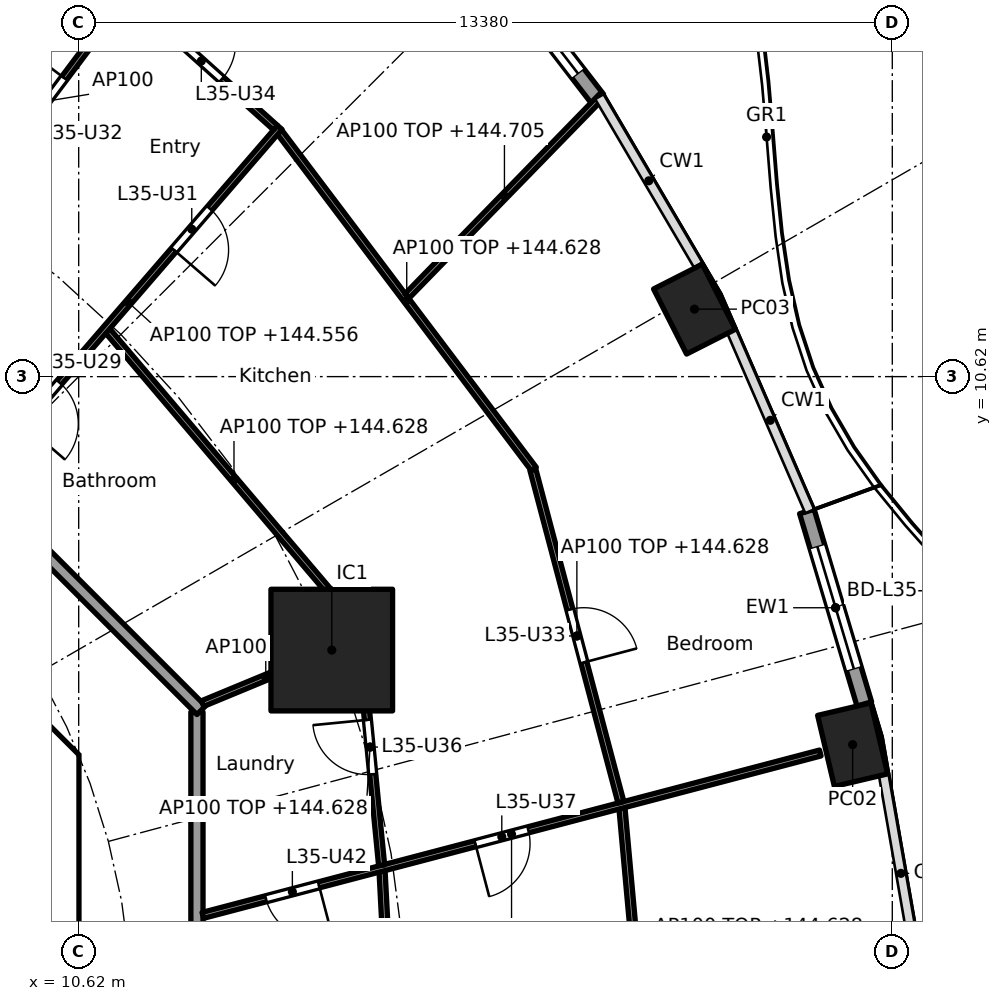
"""IFC4 building model, lengths in metres.
Left out: names, types, materials, properties, quantities, classifications, styles, units other than length and angle.
Written with IfcOpenShell. Run it as: python <this file> out.ifc"""

import sys

from ifc_helpers import new_model, si_unit, direction, frame, frame_2d, origin, origin_2d, place, context, subcontext, project, spatial, polyline, rectangle, hollow_rectangle, outline, extrude, element, fill, save


model = new_model("IFC4")
c1 = context("Model", 3, precision=1e-05, world=origin(), true_north=direction((0.0, 1.0)))
c2 = subcontext(c1, "Body", "Model", "MODEL_VIEW")
j1 = project(units=[si_unit("LENGTHUNIT", "METRE"), si_unit("PLANEANGLEUNIT", "RADIAN")], contexts=[c1])
p1 = place(None, origin())
s1 = spatial("IfcSite", under=j1, at=p1, CompositionType="ELEMENT")
p2 = place(p1, origin())
s2 = spatial("IfcBuilding", under=s1, at=p2, CompositionType="ELEMENT")
p3 = place(p2, frame((0.0, 0.0, 141.8)))
s3 = spatial("IfcBuildingStorey", under=s2, at=p3, CompositionType="ELEMENT", Elevation=141.8)
for number, where, z_axis, x_axis in (
    (1, (23.348, 4.568, 0.0), (0.0, 0.0, 1.0), (-0.229, 0.973, 0.0)),
    (2, (20.747, 11.73, 0.0), (0.0, 0.0, 1.0), (-0.452, 0.892, 0.0)),
):
    element("IfcColumn", number, at=place(p3, frame(where, z_axis=z_axis, x_axis=x_axis)), inside=s3, PredefinedType="COLUMN", context=c2, shape_type="SweptSolid", body=[
        extrude(hollow_rectangle(XDim=1.2, YDim=0.9, WallThickness=0.04, at=origin_2d()), origin(), (0.0, 0.0, 1.0), 3.7),
    ])
p4 = place(p3, frame((14.782, 6.123, 0.0), z_axis=(0.0, 0.0, 1.0), x_axis=(1.0, 0.0, 0.0)))
e3 = element("IfcColumn", 3, at=p4, inside=s3, PredefinedType="COLUMN", context=c2, shape_type="SweptSolid", body=[
    extrude(rectangle(XDim=2.0, YDim=2.0, at=origin_2d()), origin(), (0.0, 0.0, 1.0), 3.7),
])
p5 = place(p3, frame((22.595, 8.402, 0.0), z_axis=(0.0, 0.0, 1.0), x_axis=(0.285842038783, -0.958276749621, 0.0)))
e4 = element("IfcWall", 4, at=p5, inside=s3, PredefinedType="SOLIDWALL", context=c2, shape_type="SweptSolid", body=[
    extrude(rectangle(XDim=3.303, YDim=0.25, at=frame_2d((1.651, 0.0))), origin(), (0.0, 0.0, 1.0), 3.44),
])
p6 = place(p5, frame((0.602, 0.0, 0.0)))
e5 = element("IfcOpeningElement", 5, at=p6, cuts=e4, PredefinedType="OPENING", context=c2, shape_type="SweptSolid", body=[
    extrude(rectangle(XDim=2.1, YDim=2.4, at=frame_2d((1.05, 1.2))), frame((0.0, 0.135, 0.0), z_axis=(0.0, -1.0, 0.0), x_axis=(1.0, 0.0, 0.0)), (0.0, 0.0, 1.0), 0.27),
])
p7 = place(p3, frame((17.23, 17.682, 0.0), z_axis=(0.0, 0.0, 1.0), x_axis=(0.610429847179, -0.792070326217, 0.0)))
e6 = element("IfcWall", 6, at=p7, inside=s3, PredefinedType="SOLIDWALL", context=c2, shape_type="SweptSolid", body=[
    extrude(rectangle(XDim=3.149, YDim=0.25, at=frame_2d((1.575, 0.0))), origin(), (0.0, 0.0, 1.0), 3.44),
])
p8 = place(p7, frame((0.525, 0.0, 0.0)))
e7 = element("IfcOpeningElement", 7, at=p8, cuts=e6, PredefinedType="OPENING", context=c2, shape_type="SweptSolid", body=[
    extrude(rectangle(XDim=2.1, YDim=2.4, at=frame_2d((1.05, 1.2))), frame((0.0, 0.135, 0.0), z_axis=(0.0, -1.0, 0.0), x_axis=(1.0, 0.0, 0.0)), (0.0, 0.0, 1.0), 0.27),
])
p9 = place(p3, frame((9.988, 4.613, 0.0), z_axis=(0.0, 0.0, 1.0), x_axis=(-0.707106781187, 0.707106781187, 0.0)))
e8 = element("IfcWall", 8, at=p9, inside=s3, PredefinedType="SHEAR", context=c2, shape_type="SweptSolid", body=[
    extrude(rectangle(XDim=7.602, YDim=0.6, at=frame_2d((3.801, 0.0))), origin(), (0.0, 0.0, 1.0), 3.44),
])
p10 = place(p9, frame((3.201, 0.0, 0.0)))
e9 = element("IfcOpeningElement", 9, at=p10, cuts=e8, PredefinedType="OPENING", context=c2, shape_type="SweptSolid", body=[
    extrude(rectangle(XDim=1.2, YDim=2.1, at=frame_2d((0.6, 1.05))), frame((0.0, 0.31, 0.0), z_axis=(0.0, -1.0, 0.0), x_axis=(1.0, 0.0, 0.0)), (0.0, 0.0, 1.0), 0.62),
])
p11 = place(p3, origin())
e10 = element("IfcWall", 10, at=p11, inside=s3, PredefinedType="SHEAR", context=c2, shape_type="SweptSolid", body=[
    extrude(outline(polyline([(9.776, -4.401), (10.025, -4.152), (10.025, -3.801), (10.025, 4.152), (9.776, 4.401), (10.2, 4.825), (10.625, 4.401), (10.625, -4.401), (10.2, -4.825), (9.776, -4.401)])), origin(), (0.0, 0.0, 1.0), 3.44),
])
p12 = place(p3, frame((12.565, -5.104, 0.0), z_axis=(0.0, 0.0, 1.0), x_axis=(0.0, 1.0, 0.0)))
e11 = element("IfcWall", 11, at=p12, inside=s3, PredefinedType="PARTITIONING", context=c2, shape_type="SweptSolid", body=[
    extrude(rectangle(XDim=10.209, YDim=0.2, at=frame_2d((5.104, 0.0))), origin(), (0.0, 0.0, 1.0), 3.44),
])
p13 = place(p3, frame((12.635, 5.134, 0.0), z_axis=(0.0, 0.0, 1.0), x_axis=(-0.707106781187, 0.707106781187, 0.0)))
e12 = element("IfcWall", 12, at=p13, inside=s3, PredefinedType="PARTITIONING", context=c2, shape_type="SweptSolid", body=[
    extrude(rectangle(XDim=10.609, YDim=0.2, at=frame_2d((5.305, 0.0))), origin(), (0.0, 0.0, 1.0), 3.44),
])
p14 = place(p13, frame((6.106, 0.0, 0.0)))
e13 = element("IfcOpeningElement", 13, at=p14, cuts=e12, PredefinedType="OPENING", context=c2, shape_type="SweptSolid", body=[
    extrude(rectangle(XDim=1.0, YDim=2.1, at=frame_2d((0.5, 1.05))), frame((0.0, 0.11, 0.0), z_axis=(0.0, -1.0, 0.0), x_axis=(1.0, 0.0, 0.0)), (0.0, 0.0, 1.0), 0.22),
])
p15 = place(p3, frame((15.853, -2.158, 0.0), z_axis=(0.0, 0.0, 1.0), x_axis=(-0.052509224895, 0.998620439056, 0.0)))
e14 = element("IfcWall", 14, at=p15, inside=s3, PredefinedType="PARTITIONING", context=c2, shape_type="SweptSolid", body=[
    extrude(rectangle(XDim=4.649, YDim=0.1, at=frame_2d((2.325, 0.0))), origin(), (0.0, 0.0, 1.0), 2.828),
])
p16 = place(p3, frame((20.115, -2.642, 0.0), z_axis=(0.0, 0.0, 1.0), x_axis=(-0.090567755363, 0.995890296011, 0.0)))
e15 = element("IfcWall", 15, at=p16, inside=s3, PredefinedType="PARTITIONING", context=c2, shape_type="SweptSolid", body=[
    extrude(rectangle(XDim=6.189, YDim=0.1, at=frame_2d((3.095, 0.0))), origin(), (0.0, 0.0, 1.0), 2.828),
])
p17 = place(p16, frame((2.67, 0.0, 0.0)))
e16 = element("IfcOpeningElement", 16, at=p17, cuts=e15, PredefinedType="OPENING", context=c2, shape_type="SweptSolid", body=[
    extrude(rectangle(XDim=0.9, YDim=2.1, at=frame_2d((0.45, 1.05))), frame((0.0, 0.06, 0.0), z_axis=(0.0, -1.0, 0.0), x_axis=(1.0, 0.0, 0.0)), (0.0, 0.0, 1.0), 0.12),
])
p18 = place(p3, frame((12.661, 1.76, 0.0), z_axis=(0.0, 0.0, 1.0), x_axis=(0.967120304949, 0.254319318488, 0.0)))
e17 = element("IfcWall", 17, at=p18, inside=s3, PredefinedType="PARTITIONING", context=c2, shape_type="SweptSolid", body=[
    extrude(rectangle(XDim=10.499, YDim=0.1, at=frame_2d((5.25, 0.0))), origin(), (0.0, 0.0, 1.0), 2.756),
])
p19 = place(p18, frame((4.634, 0.0, 0.0)))
e18 = element("IfcOpeningElement", 18, at=p19, cuts=e17, PredefinedType="OPENING", context=c2, shape_type="SweptSolid", body=[
    extrude(rectangle(XDim=0.9, YDim=2.1, at=frame_2d((0.45, 1.05))), frame((0.0, 0.06, 0.0), z_axis=(0.0, -1.0, 0.0), x_axis=(1.0, 0.0, 0.0)), (0.0, 0.0, 1.0), 0.12),
])
p20 = place(p18, frame((1.073, 0.0, 0.0)))
e19 = element("IfcOpeningElement", 19, at=p20, cuts=e17, PredefinedType="OPENING", context=c2, shape_type="SweptSolid", body=[
    extrude(rectangle(XDim=0.9, YDim=2.1, at=frame_2d((0.45, 1.05))), frame((0.0, 0.06, 0.0), z_axis=(0.0, -1.0, 0.0), x_axis=(1.0, 0.0, 0.0)), (0.0, 0.0, 1.0), 0.12),
])
p21 = place(p3, frame((15.602, 2.584, 0.0), z_axis=(0.0, 0.0, 1.0), x_axis=(-0.097207196705, 0.995264166394, 0.0)))
e20 = element("IfcWall", 20, at=p21, inside=s3, PredefinedType="PARTITIONING", context=c2, shape_type="SweptSolid", body=[
    extrude(rectangle(XDim=3.906, YDim=0.1, at=frame_2d((1.953, 0.0))), origin(), (0.0, 0.0, 1.0), 2.828),
])
p22 = place(p21, frame((1.503, 0.0, 0.0)))
e21 = element("IfcOpeningElement", 21, at=p22, cuts=e20, PredefinedType="OPENING", context=c2, shape_type="SweptSolid", body=[
    extrude(rectangle(XDim=0.9, YDim=2.1, at=frame_2d((0.45, 1.05))), frame((0.0, 0.06, 0.0), z_axis=(0.0, -1.0, 0.0), x_axis=(1.0, 0.0, 0.0)), (0.0, 0.0, 1.0), 0.12),
])
p23 = place(p3, frame((19.537, 3.62, 0.0), z_axis=(0.0, 0.0, 1.0), x_axis=(-0.255892560316, 0.966705227862, 0.0)))
e22 = element("IfcWall", 22, at=p23, inside=s3, PredefinedType="PARTITIONING", context=c2, shape_type="SweptSolid", body=[
    extrude(rectangle(XDim=5.659, YDim=0.1, at=frame_2d((2.829, 0.0))), origin(), (0.0, 0.0, 1.0), 2.828),
])
p24 = place(p23, frame((2.379, 0.0, 0.0)))
e23 = element("IfcOpeningElement", 23, at=p24, cuts=e22, PredefinedType="OPENING", context=c2, shape_type="SweptSolid", body=[
    extrude(rectangle(XDim=0.9, YDim=2.1, at=frame_2d((0.45, 1.05))), frame((0.0, 0.06, 0.0), z_axis=(0.0, -1.0, 0.0), x_axis=(1.0, 0.0, 0.0)), (0.0, 0.0, 1.0), 0.12),
])
p25 = place(p3, frame((12.657, 5.243, 0.0), z_axis=(0.0, 0.0, 1.0), x_axis=(0.923864733477, 0.382719158442, 0.0)))
e24 = element("IfcWall", 24, at=p25, inside=s3, PredefinedType="PARTITIONING", context=c2, shape_type="SweptSolid", body=[
    extrude(rectangle(XDim=2.25, YDim=0.1, at=frame_2d((1.125, 0.0))), origin(), (0.0, 0.0, 1.0), 3.44),
])
p26 = place(p3, frame((15.25, 6.483, 0.0), z_axis=(0.0, 0.0, 1.0), x_axis=(-0.647379829894, 0.762167537912, 0.0)))
e25 = element("IfcWall", 25, at=p26, inside=s3, PredefinedType="PARTITIONING", context=c2, shape_type="SweptSolid", body=[
    extrude(rectangle(XDim=6.413, YDim=0.1, at=frame_2d((3.206, 0.0))), origin(), (0.0, 0.0, 1.0), 2.828),
])
p27 = place(p3, frame((18.106, 9.098, 0.0), z_axis=(0.0, 0.0, 1.0), x_axis=(-0.602393803621, 0.798199038686, 0.0)))
e26 = element("IfcWall", 26, at=p27, inside=s3, PredefinedType="PARTITIONING", context=c2, shape_type="SweptSolid", body=[
    extrude(rectangle(XDim=6.944, YDim=0.1, at=frame_2d((3.472, 0.0))), origin(), (0.0, 0.0, 1.0), 2.828),
])
p28 = place(p3, frame((16.02, 11.946, 0.0), z_axis=(0.0, 0.0, 1.0), x_axis=(0.697741638446, 0.71634949988, 0.0)))
e27 = element("IfcWall", 27, at=p28, inside=s3, PredefinedType="PARTITIONING", context=c2, shape_type="SweptSolid", body=[
    extrude(rectangle(XDim=4.592, YDim=0.1, at=frame_2d((2.296, 0.0))), origin(), (0.0, 0.0, 1.0), 2.905),
])
p29 = place(p3, frame((8.95, 8.96, 0.0), z_axis=(0.0, 0.0, 1.0), x_axis=(0.653829477183, 0.756641932995, 0.0)))
e28 = element("IfcWall", 28, at=p29, inside=s3, PredefinedType="PARTITIONING", context=c2, shape_type="SweptSolid", body=[
    extrude(rectangle(XDim=7.611, YDim=0.1, at=frame_2d((3.805, 0.0))), origin(), (0.0, 0.0, 1.0), 2.756),
])
p30 = place(p29, frame((1.168, 0.0, 0.0)))
e29 = element("IfcOpeningElement", 29, at=p30, cuts=e28, PredefinedType="OPENING", context=c2, shape_type="SweptSolid", body=[
    extrude(rectangle(XDim=0.9, YDim=2.1, at=frame_2d((0.45, 1.05))), frame((0.0, 0.06, 0.0), z_axis=(0.0, -1.0, 0.0), x_axis=(1.0, 0.0, 0.0)), (0.0, 0.0, 1.0), 0.12),
])
p31 = place(p29, frame((4.948, 0.0, 0.0)))
e30 = element("IfcOpeningElement", 30, at=p31, cuts=e28, PredefinedType="OPENING", context=c2, shape_type="SweptSolid", body=[
    extrude(rectangle(XDim=0.9, YDim=2.1, at=frame_2d((0.45, 1.05))), frame((0.0, 0.06, 0.0), z_axis=(0.0, -1.0, 0.0), x_axis=(1.0, 0.0, 0.0)), (0.0, 0.0, 1.0), 0.12),
])
p32 = place(p3, frame((13.856, 14.714, 0.0), z_axis=(0.0, 0.0, 1.0), x_axis=(-0.743793479211, 0.668409500444, 0.0)))
e31 = element("IfcWall", 31, at=p32, inside=s3, PredefinedType="PARTITIONING", context=c2, shape_type="SweptSolid", body=[
    extrude(rectangle(XDim=6.659, YDim=0.1, at=frame_2d((3.329, 0.0))), origin(), (0.0, 0.0, 1.0), 2.828),
])
p33 = place(p32, frame((1.19, 0.0, 0.0)))
e32 = element("IfcOpeningElement", 32, at=p33, cuts=e31, PredefinedType="OPENING", context=c2, shape_type="SweptSolid", body=[
    extrude(rectangle(XDim=0.9, YDim=2.1, at=frame_2d((0.45, 1.05))), frame((0.0, 0.06, 0.0), z_axis=(0.0, -1.0, 0.0), x_axis=(1.0, 0.0, 0.0)), (0.0, 0.0, 1.0), 0.12),
])
p34 = place(p3, frame((8.81, 13.434, 0.0), z_axis=(0.0, 0.0, 1.0), x_axis=(0.600491337497, 0.799631261014, 0.0)))
e33 = element("IfcWall", 33, at=p34, inside=s3, PredefinedType="PARTITIONING", context=c2, shape_type="SweptSolid", body=[
    extrude(rectangle(XDim=4.292, YDim=0.1, at=frame_2d((2.146, 0.0))), origin(), (0.0, 0.0, 1.0), 3.44),
])
p35 = place(p34, frame((1.721, 0.0, 0.0)))
e34 = element("IfcOpeningElement", 34, at=p35, cuts=e33, PredefinedType="OPENING", context=c2, shape_type="SweptSolid", body=[
    extrude(rectangle(XDim=0.9, YDim=2.1, at=frame_2d((0.45, 1.05))), frame((0.0, 0.06, 0.0), z_axis=(0.0, -1.0, 0.0), x_axis=(1.0, 0.0, 0.0)), (0.0, 0.0, 1.0), 0.12),
])
p36 = place(p6, origin())
e35 = element("IfcDoor", 35, at=p36, inside=s3, OperationType="SLIDING_TO_LEFT", PredefinedType="DOOR", context=c2, shape_type="SweptSolid", body=[
    extrude(rectangle(XDim=2.1, YDim=2.4, at=frame_2d((1.05, 1.2))), frame((0.0, 0.025, 0.0), z_axis=(0.0, -1.0, 0.0), x_axis=(1.0, 0.0, 0.0)), (0.0, 0.0, 1.0), 0.05),
])
fill(e5, e35)
p37 = place(p8, origin())
e36 = element("IfcDoor", 36, at=p37, inside=s3, OperationType="SLIDING_TO_LEFT", PredefinedType="DOOR", context=c2, shape_type="SweptSolid", body=[
    extrude(rectangle(XDim=2.1, YDim=2.4, at=frame_2d((1.05, 1.2))), frame((0.0, 0.025, 0.0), z_axis=(0.0, -1.0, 0.0), x_axis=(1.0, 0.0, 0.0)), (0.0, 0.0, 1.0), 0.05),
])
fill(e7, e36)
p38 = place(p30, frame((0.9, 0.0, 0.0), x_axis=(-1.0, 0.0, 0.0)))
e37 = element("IfcDoor", 37, at=p38, inside=s3, OperationType="SINGLE_SWING_RIGHT", PredefinedType="DOOR", context=c2, shape_type="SweptSolid", body=[
    extrude(rectangle(XDim=0.9, YDim=2.1, at=frame_2d((0.45, 1.05))), frame((0.0, 0.025, 0.0), z_axis=(0.0, -1.0, 0.0), x_axis=(1.0, 0.0, 0.0)), (0.0, 0.0, 1.0), 0.05),
])
fill(e29, e37)
p39 = place(p31, frame((0.9, 0.0, 0.0), x_axis=(-1.0, 0.0, 0.0)))
e38 = element("IfcDoor", 38, at=p39, inside=s3, OperationType="SINGLE_SWING_RIGHT", PredefinedType="DOOR", context=c2, shape_type="SweptSolid", body=[
    extrude(rectangle(XDim=0.9, YDim=2.1, at=frame_2d((0.45, 1.05))), frame((0.0, 0.025, 0.0), z_axis=(0.0, -1.0, 0.0), x_axis=(1.0, 0.0, 0.0)), (0.0, 0.0, 1.0), 0.05),
])
fill(e30, e38)
p40 = place(p35, origin())
e39 = element("IfcDoor", 39, at=p40, inside=s3, OperationType="SINGLE_SWING_RIGHT", PredefinedType="DOOR", context=c2, shape_type="SweptSolid", body=[
    extrude(rectangle(XDim=0.9, YDim=2.1, at=frame_2d((0.45, 1.05))), frame((0.0, 0.025, 0.0), z_axis=(0.0, -1.0, 0.0), x_axis=(1.0, 0.0, 0.0)), (0.0, 0.0, 1.0), 0.05),
])
fill(e34, e39)
p41 = place(p24, frame((0.9, 0.0, 0.0), x_axis=(-1.0, 0.0, 0.0)))
e40 = element("IfcDoor", 40, at=p41, inside=s3, OperationType="SINGLE_SWING_RIGHT", PredefinedType="DOOR", context=c2, shape_type="SweptSolid", body=[
    extrude(rectangle(XDim=0.9, YDim=2.1, at=frame_2d((0.45, 1.05))), frame((0.0, 0.025, 0.0), z_axis=(0.0, -1.0, 0.0), x_axis=(1.0, 0.0, 0.0)), (0.0, 0.0, 1.0), 0.05),
])
fill(e23, e40)
p42 = place(p33, frame((0.9, 0.0, 0.0), x_axis=(-1.0, 0.0, 0.0)))
e41 = element("IfcDoor", 41, at=p42, inside=s3, OperationType="SINGLE_SWING_LEFT", PredefinedType="DOOR", context=c2, shape_type="SweptSolid", body=[
    extrude(rectangle(XDim=0.9, YDim=2.1, at=frame_2d((0.45, 1.05))), frame((0.0, 0.025, 0.0), z_axis=(0.0, -1.0, 0.0), x_axis=(1.0, 0.0, 0.0)), (0.0, 0.0, 1.0), 0.05),
])
fill(e32, e41)
p43 = place(p22, origin())
e42 = element("IfcDoor", 42, at=p43, inside=s3, OperationType="SINGLE_SWING_RIGHT", PredefinedType="DOOR", context=c2, shape_type="SweptSolid", body=[
    extrude(rectangle(XDim=0.9, YDim=2.1, at=frame_2d((0.45, 1.05))), frame((0.0, 0.025, 0.0), z_axis=(0.0, -1.0, 0.0), x_axis=(1.0, 0.0, 0.0)), (0.0, 0.0, 1.0), 0.05),
])
fill(e21, e42)
p44 = place(p19, frame((0.9, 0.0, 0.0), x_axis=(-1.0, 0.0, 0.0)))
e43 = element("IfcDoor", 43, at=p44, inside=s3, OperationType="SINGLE_SWING_RIGHT", PredefinedType="DOOR", context=c2, shape_type="SweptSolid", body=[
    extrude(rectangle(XDim=0.9, YDim=2.1, at=frame_2d((0.45, 1.05))), frame((0.0, 0.025, 0.0), z_axis=(0.0, -1.0, 0.0), x_axis=(1.0, 0.0, 0.0)), (0.0, 0.0, 1.0), 0.05),
])
fill(e18, e43)
p45 = place(p20, frame((0.9, 0.0, 0.0), x_axis=(-1.0, 0.0, 0.0)))
e44 = element("IfcDoor", 44, at=p45, inside=s3, OperationType="SINGLE_SWING_LEFT", PredefinedType="DOOR", context=c2, shape_type="SweptSolid", body=[
    extrude(rectangle(XDim=0.9, YDim=2.1, at=frame_2d((0.45, 1.05))), frame((0.0, 0.025, 0.0), z_axis=(0.0, -1.0, 0.0), x_axis=(1.0, 0.0, 0.0)), (0.0, 0.0, 1.0), 0.05),
])
fill(e19, e44)
save(model, sys.argv[1])
